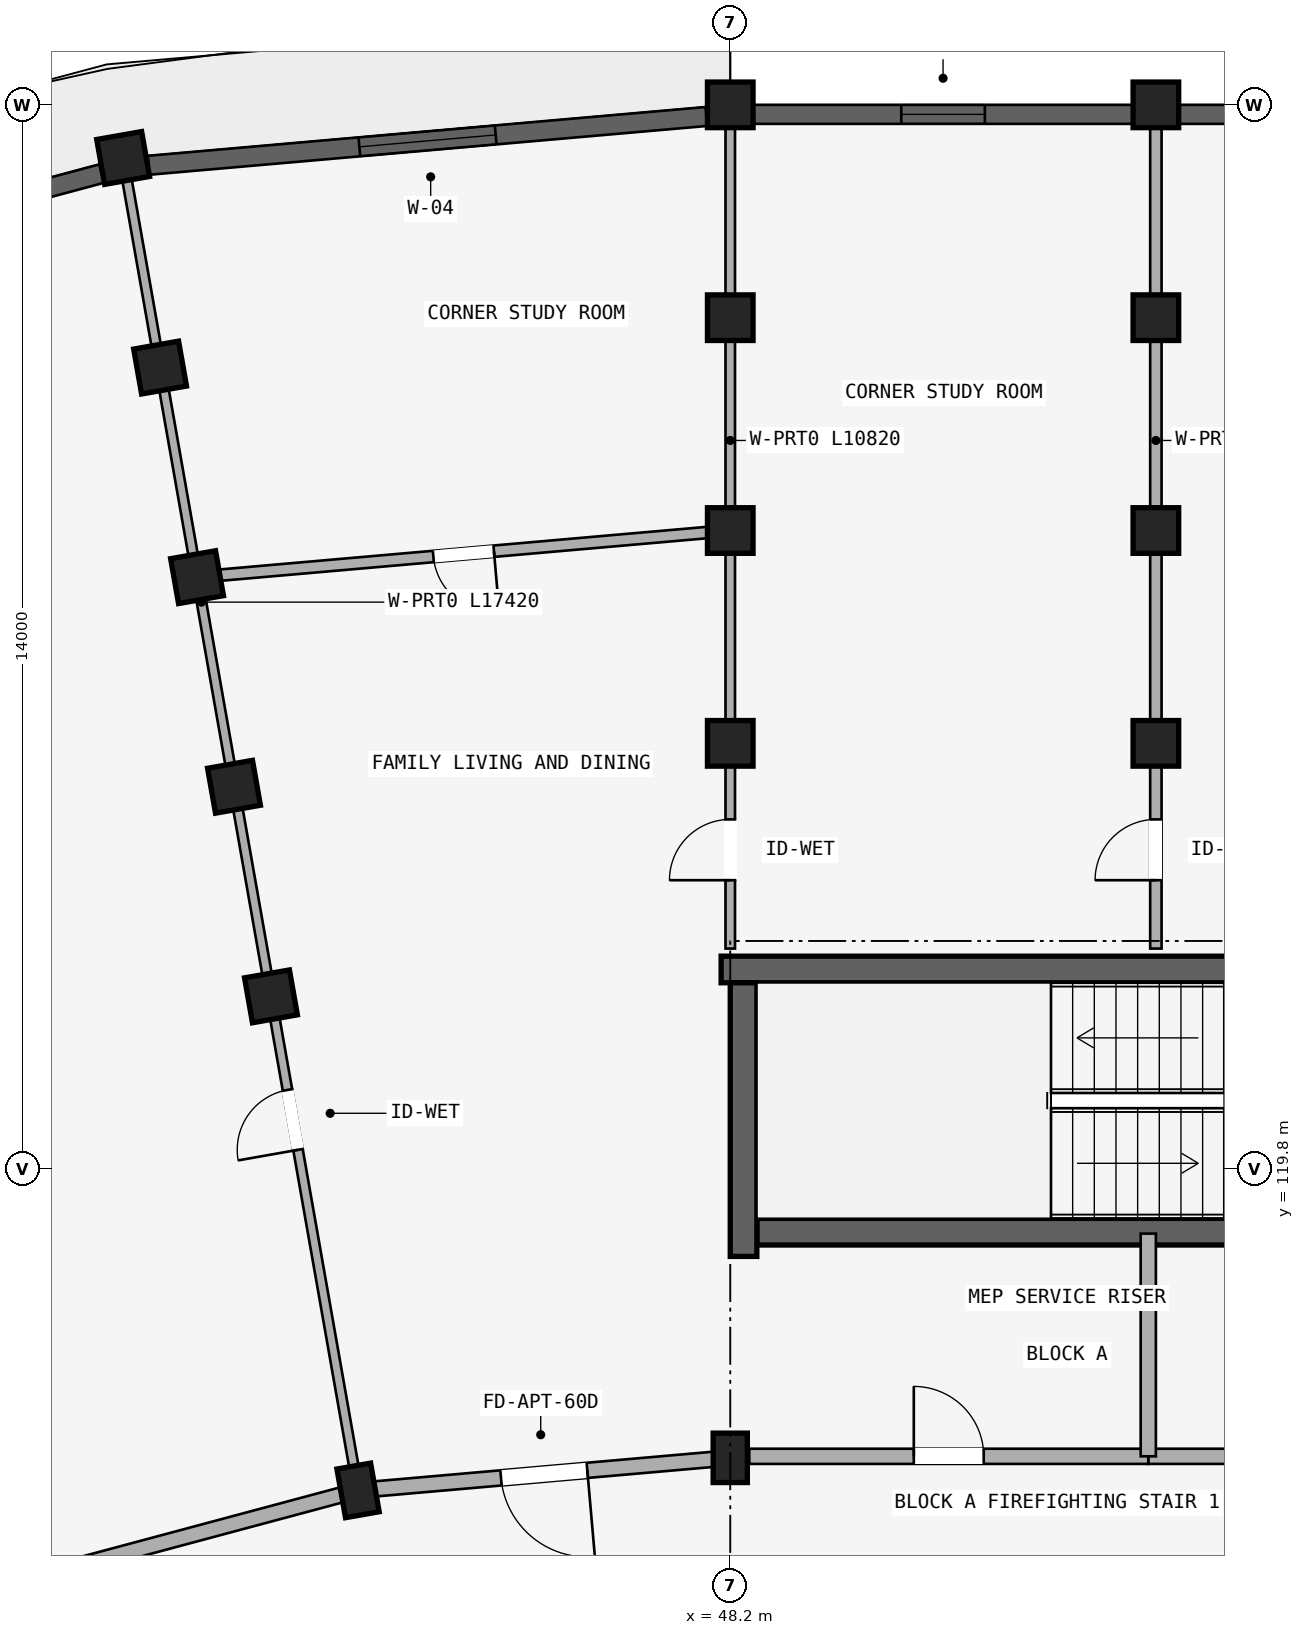
"""IFC4 building model, lengths in metres.
Left out: names, types, materials, properties, quantities, classifications, styles, units other than length and angle.
Written with IfcOpenShell. Run it as: python <this file> out.ifc"""

import sys

from ifc_helpers import new_model, si_unit, direction, frame, frame_2d, origin, origin_2d, place, context, subcontext, project, spatial, rectangle, extrude, element, fill, save


model = new_model("IFC4")
c1 = context("Model", 3, precision=1e-05, world=origin(), true_north=direction((0.0, 1.0)))
c2 = subcontext(c1, "Body", "Model", "MODEL_VIEW")
j1 = project(units=[si_unit("LENGTHUNIT", "METRE"), si_unit("PLANEANGLEUNIT", "RADIAN")], contexts=[c1])
p1 = place(None, origin())
s1 = spatial("IfcSite", under=j1, at=p1, CompositionType="ELEMENT")
p2 = place(p1, origin())
s2 = spatial("IfcBuilding", under=s1, at=p2, CompositionType="ELEMENT")
p3 = place(p2, frame((0.0, 0.0, 30.75)))
s3 = spatial("IfcBuildingStorey", under=s2, at=p3, CompositionType="ELEMENT", Elevation=30.75)
p4 = place(p3, frame((48.08, 122.425, 0.0), z_axis=(0.0, 0.0, 1.0), x_axis=(1.0, 0.0, 0.0)))
e1 = element("IfcWall", 1, at=p4, inside=s3, PredefinedType="SHEAR", context=c2, shape_type="SweptSolid", body=[
    extrude(rectangle(XDim=8.545, YDim=0.35, at=frame_2d((4.272, 0.0))), origin(), (0.0, 0.0, 1.0), 2.93),
])
p5 = place(p3, frame((48.55, 118.975, 0.0), z_axis=(0.0, 0.0, 1.0), x_axis=(1.0, 0.0, 0.0)))
e2 = element("IfcWall", 2, at=p5, inside=s3, PredefinedType="SHEAR", context=c2, shape_type="SweptSolid", body=[
    extrude(rectangle(XDim=8.075, YDim=0.35, at=frame_2d((4.038, 0.0))), origin(), (0.0, 0.0, 1.0), 2.93),
])
p6 = place(p5, frame((6.38, 0.0, 0.0)))
e3 = element("IfcOpeningElement", 3, at=p6, cuts=e2, PredefinedType="OPENING", context=c2, shape_type="SweptSolid", body=[
    extrude(rectangle(XDim=1.24, YDim=2.15, at=frame_2d((0.62, 1.075))), frame((0.0, 0.185, 0.0), z_axis=(0.0, -1.0, 0.0), x_axis=(1.0, 0.0, 0.0)), (0.0, 0.0, 1.0), 0.37),
])
p7 = place(p3, frame((48.375, 118.65, 0.0), z_axis=(0.0, 0.0, 1.0), x_axis=(0.0, 1.0, 0.0)))
e4 = element("IfcWall", 4, at=p7, inside=s3, PredefinedType="SHEAR", context=c2, shape_type="SweptSolid", body=[
    extrude(rectangle(XDim=3.6, YDim=0.35, at=frame_2d((1.8, 0.0))), origin(), (0.0, 0.0, 1.0), 2.93),
])
p8 = place(p3, frame((48.2, 116.0, 0.0), z_axis=(0.0, 0.0, 1.0), x_axis=(1.0, 0.0, 0.0)))
e5 = element("IfcColumn", 5, at=p8, inside=s3, PredefinedType="COLUMN", context=c2, shape_type="SweptSolid", body=[
    extrude(rectangle(XDim=0.45, YDim=0.65, at=origin_2d()), origin(), (0.0, 0.0, 1.0), 2.93),
])
for number, where, z_axis, x_axis in (
    (6, (48.2, 125.4, 0.0), (0.0, 0.0, 1.0), (1.0, 0.0, 0.0)),
    (7, (48.2, 128.2, 0.0), (0.0, 0.0, 1.0), (1.0, 0.0, 0.0)),
    (8, (48.2, 131.0, 0.0), (0.0, 0.0, 1.0), (1.0, 0.0, 0.0)),
    (9, (48.2, 133.8, 0.0), (0.0, 0.0, 1.0), (1.0, 0.0, 0.0)),
):
    element("IfcColumn", number, at=place(p3, frame(where, z_axis=z_axis, x_axis=x_axis)), inside=s3, PredefinedType="COLUMN", context=c2, shape_type="SweptSolid", body=[
        extrude(rectangle(XDim=0.6, YDim=0.6, at=origin_2d()), origin(), (0.0, 0.0, 1.0), 2.93),
    ])
p9 = place(p3, frame((43.303, 115.572, 0.0), z_axis=(0.0, 0.0, 1.0), x_axis=(0.984807753012, 0.173648177667, 0.0)))
e10 = element("IfcColumn", 10, at=p9, inside=s3, PredefinedType="COLUMN", context=c2, shape_type="SweptSolid", body=[
    extrude(rectangle(XDim=0.45, YDim=0.65, at=origin_2d()), origin(), (0.0, 0.0, 1.0), 2.93),
])
for number, where, z_axis, x_axis in (
    (11, (42.157, 122.071, 0.0), (0.0, 0.0, 1.0), (0.985, 0.174, 0.0)),
    (12, (41.671, 124.829, 0.0), (0.0, 0.0, 1.0), (0.985, 0.174, 0.0)),
    (13, (41.185, 127.586, 0.0), (0.0, 0.0, 1.0), (0.985, 0.174, 0.0)),
    (14, (40.698, 130.344, 0.0), (0.0, 0.0, 1.0), (0.985, 0.174, 0.0)),
    (15, (40.212, 133.101, 0.0), (0.0, 0.0, 1.0), (0.985, 0.174, 0.0)),
    (16, (53.8, 125.4, 0.0), (0.0, 0.0, 1.0), (1.0, 0.0, 0.0)),
    (17, (53.8, 128.2, 0.0), (0.0, 0.0, 1.0), (1.0, 0.0, 0.0)),
    (18, (53.8, 131.0, 0.0), (0.0, 0.0, 1.0), (1.0, 0.0, 0.0)),
    (19, (53.8, 133.8, 0.0), (0.0, 0.0, 1.0), (1.0, 0.0, 0.0)),
):
    element("IfcColumn", number, at=place(p3, frame(where, z_axis=z_axis, x_axis=x_axis)), inside=s3, PredefinedType="COLUMN", context=c2, shape_type="SweptSolid", body=[
        extrude(rectangle(XDim=0.6, YDim=0.6, at=origin_2d()), origin(), (0.0, 0.0, 1.0), 2.93),
    ])
p10 = place(p3, frame((53.7, 116.02, 0.0), z_axis=(0.0, 0.0, 1.0), x_axis=(1.0, 0.0, 0.0)))
e20 = element("IfcWall", 20, at=p10, inside=s3, PredefinedType="STANDARD", context=c2, shape_type="SweptSolid", body=[
    extrude(rectangle(XDim=5.65, YDim=0.2, at=frame_2d((2.825, 0.0))), origin(), (0.0, 0.0, 1.0), 2.372),
])
p11 = place(p10, frame((1.923, 0.0, 0.0)))
e21 = element("IfcOpeningElement", 21, at=p11, cuts=e20, PredefinedType="OPENING", context=c2, shape_type="SweptSolid", body=[
    extrude(rectangle(XDim=1.24, YDim=2.15, at=frame_2d((0.62, 1.075))), frame((0.0, 0.11, 0.0), z_axis=(0.0, -1.0, 0.0), x_axis=(1.0, 0.0, 0.0)), (0.0, 0.0, 1.0), 0.22),
])
p12 = place(p3, frame((48.45, 116.02, 0.0), z_axis=(0.0, 0.0, 1.0), x_axis=(1.0, 0.0, 0.0)))
e22 = element("IfcWall", 22, at=p12, inside=s3, PredefinedType="STANDARD", context=c2, shape_type="SweptSolid", body=[
    extrude(rectangle(XDim=5.25, YDim=0.2, at=frame_2d((2.625, 0.0))), origin(), (0.0, 0.0, 1.0), 2.372),
])
p13 = place(p12, frame((2.165, 0.0, 0.0)))
e23 = element("IfcOpeningElement", 23, at=p13, cuts=e22, PredefinedType="OPENING", context=c2, shape_type="SweptSolid", body=[
    extrude(rectangle(XDim=0.92, YDim=2.1, at=frame_2d((0.46, 1.05))), frame((0.0, 0.11, 0.0), z_axis=(0.0, -1.0, 0.0), x_axis=(1.0, 0.0, 0.0)), (0.0, 0.0, 1.0), 0.22),
])
p14 = place(p3, frame((53.7, 116.02, 0.0), z_axis=(0.0, 0.0, 1.0), x_axis=(0.0, 1.0, 0.0)))
e24 = element("IfcWall", 24, at=p14, inside=s3, PredefinedType="STANDARD", context=c2, shape_type="SweptSolid", body=[
    extrude(rectangle(XDim=2.93, YDim=0.2, at=frame_2d((1.465, 0.0))), origin(), (0.0, 0.0, 1.0), 2.372),
])
p15 = place(p3, frame((53.8, 122.7, 0.0), z_axis=(0.0, 0.0, 1.0), x_axis=(0.0, 1.0, 0.0)))
e25 = element("IfcWall", 25, at=p15, inside=s3, PredefinedType="PARTITIONING", context=c2, shape_type="SweptSolid", body=[
    extrude(rectangle(XDim=10.82, YDim=0.15, at=frame_2d((5.41, 0.0))), origin(), (0.0, 0.0, 1.0), 2.372),
])
p16 = place(p15, frame((0.899, 0.0, 0.0)))
e26 = element("IfcOpeningElement", 26, at=p16, cuts=e25, PredefinedType="OPENING", context=c2, shape_type="SweptSolid", body=[
    extrude(rectangle(XDim=0.8, YDim=2.1, at=frame_2d((0.4, 1.05))), frame((0.0, 0.085, 0.0), z_axis=(0.0, -1.0, 0.0), x_axis=(1.0, 0.0, 0.0)), (0.0, 0.0, 1.0), 0.17),
])
p17 = place(p3, frame((48.2, 116.0, 0.0), z_axis=(0.0, 0.0, 1.0), x_axis=(-0.996193663584, -0.087167566415, 0.0)))
e27 = element("IfcWall", 27, at=p17, inside=s3, PredefinedType="STANDARD", context=c2, shape_type="SweptSolid", body=[
    extrude(rectangle(XDim=4.916, YDim=0.2, at=frame_2d((2.458, 0.0))), origin(), (0.0, 0.0, 1.0), 2.372),
])
p18 = place(p17, frame((1.888, 0.0, 0.0)))
e28 = element("IfcOpeningElement", 28, at=p18, cuts=e27, PredefinedType="OPENING", context=c2, shape_type="SweptSolid", body=[
    extrude(rectangle(XDim=1.14, YDim=2.15, at=frame_2d((0.57, 1.075))), frame((0.0, 0.11, 0.0), z_axis=(0.0, -1.0, 0.0), x_axis=(1.0, 0.0, 0.0)), (0.0, 0.0, 1.0), 0.22),
])
p19 = place(p3, frame((43.303, 115.572, 0.0), z_axis=(0.0, 0.0, 1.0), x_axis=(-0.965930095386, -0.258803112091, 0.0)))
e29 = element("IfcWall", 29, at=p19, inside=s3, PredefinedType="STANDARD", context=c2, shape_type="SweptSolid", body=[
    extrude(rectangle(XDim=4.916, YDim=0.2, at=frame_2d((2.458, 0.0))), origin(), (0.0, 0.0, 1.0), 2.372),
])
p20 = place(p3, frame((48.2, 122.7, 0.0), z_axis=(0.0, 0.0, 1.0), x_axis=(0.0, 1.0, 0.0)))
e30 = element("IfcWall", 30, at=p20, inside=s3, PredefinedType="PARTITIONING", context=c2, shape_type="SweptSolid", body=[
    extrude(rectangle(XDim=10.82, YDim=0.125, at=frame_2d((5.41, 0.0))), origin(), (0.0, 0.0, 1.0), 2.372),
])
p21 = place(p20, frame((0.899, 0.0, 0.0)))
e31 = element("IfcOpeningElement", 31, at=p21, cuts=e30, PredefinedType="OPENING", context=c2, shape_type="SweptSolid", body=[
    extrude(rectangle(XDim=0.8, YDim=2.1, at=frame_2d((0.4, 1.05))), frame((0.0, 0.073, 0.0), z_axis=(0.0, -1.0, 0.0), x_axis=(1.0, 0.0, 0.0)), (0.0, 0.0, 1.0), 0.145),
])
p22 = place(p3, frame((43.286, 115.67, 0.0), z_axis=(0.0, 0.0, 1.0), x_axis=(-0.173646216546, 0.984808098809, 0.0)))
e32 = element("IfcWall", 32, at=p22, inside=s3, PredefinedType="PARTITIONING", context=c2, shape_type="SweptSolid", body=[
    extrude(rectangle(XDim=17.42, YDim=0.125, at=frame_2d((8.71, 0.0))), origin(), (0.0, 0.0, 1.0), 2.372),
])
p23 = place(p22, frame((4.45, 0.0, 0.0)))
e33 = element("IfcOpeningElement", 33, at=p23, cuts=e32, PredefinedType="OPENING", context=c2, shape_type="SweptSolid", body=[
    extrude(rectangle(XDim=0.8, YDim=2.1, at=frame_2d((0.4, 1.05))), frame((0.0, 0.073, 0.0), z_axis=(0.0, -1.0, 0.0), x_axis=(1.0, 0.0, 0.0)), (0.0, 0.0, 1.0), 0.145),
])
p24 = place(p3, frame((48.2, 128.2, 0.0), z_axis=(0.0, 0.0, 1.0), x_axis=(-0.996194658198, -0.087156198737, 0.0)))
e34 = element("IfcWall", 34, at=p24, inside=s3, PredefinedType="PLUMBINGWALL", context=c2, shape_type="SweptSolid", body=[
    extrude(rectangle(XDim=7.042, YDim=0.15, at=frame_2d((3.521, 0.0))), origin(), (0.0, 0.0, 1.0), 2.372),
])
p25 = place(p24, frame((3.121, 0.0, 0.0)))
e35 = element("IfcOpeningElement", 35, at=p25, cuts=e34, PredefinedType="OPENING", context=c2, shape_type="SweptSolid", body=[
    extrude(rectangle(XDim=0.8, YDim=2.1, at=frame_2d((0.4, 1.05))), frame((0.0, 0.085, 0.0), z_axis=(0.0, -1.0, 0.0), x_axis=(1.0, 0.0, 0.0)), (0.0, 0.0, 1.0), 0.17),
])
p26 = place(p3, frame((47.886, 133.647, 0.0), z_axis=(0.0, 0.0, 1.0), x_axis=(-0.996197565379, -0.087122963287, 0.0)))
e36 = element("IfcWall", 36, at=p26, inside=s3, PredefinedType="STANDARD", context=c2, shape_type="SweptSolid", body=[
    extrude(rectangle(XDim=7.367, YDim=0.25, at=frame_2d((3.684, 0.0))), origin(), (0.0, 0.0, 1.0), 2.372),
])
p27 = place(p26, frame((2.783, 0.0, 0.522)))
e37 = element("IfcOpeningElement", 37, at=p27, cuts=e36, PredefinedType="OPENING", context=c2, shape_type="SweptSolid", body=[
    extrude(rectangle(XDim=1.8, YDim=1.65, at=frame_2d((0.9, 0.825))), frame((0.0, 0.135, 0.0), z_axis=(0.0, -1.0, 0.0), x_axis=(1.0, 0.0, 0.0)), (0.0, 0.0, 1.0), 0.27),
])
p28 = place(p3, frame((39.93, 132.896, 0.0), z_axis=(0.0, 0.0, 1.0), x_axis=(-0.965925122991, -0.258821669831, 0.0)))
e38 = element("IfcWall", 38, at=p28, inside=s3, PredefinedType="STANDARD", context=c2, shape_type="SweptSolid", body=[
    extrude(rectangle(XDim=7.367, YDim=0.25, at=frame_2d((3.684, 0.0))), origin(), (0.0, 0.0, 1.0), 2.372),
])
p29 = place(p28, frame((4.84, 0.0, 0.372)))
e39 = element("IfcOpeningElement", 39, at=p29, cuts=e38, PredefinedType="OPENING", context=c2, shape_type="SweptSolid", body=[
    extrude(rectangle(XDim=1.2, YDim=1.5, at=frame_2d((0.6, 0.75))), frame((0.0, 0.135, 0.0), z_axis=(0.0, -1.0, 0.0), x_axis=(1.0, 0.0, 0.0)), (0.0, 0.0, 1.0), 0.27),
])
p30 = place(p28, frame((1.948, 0.0, 0.0)))
e40 = element("IfcOpeningElement", 40, at=p30, cuts=e38, PredefinedType="OPENING", context=c2, shape_type="SweptSolid", body=[
    extrude(rectangle(XDim=1.26, YDim=2.15, at=frame_2d((0.63, 1.075))), frame((0.0, 0.135, 0.0), z_axis=(0.0, -1.0, 0.0), x_axis=(1.0, 0.0, 0.0)), (0.0, 0.0, 1.0), 0.27),
])
p31 = place(p3, frame((48.503, 133.675, 0.0), z_axis=(0.0, 0.0, 1.0), x_axis=(1.0, 0.0, 0.0)))
e41 = element("IfcWall", 41, at=p31, inside=s3, PredefinedType="STANDARD", context=c2, shape_type="SweptSolid", body=[
    extrude(rectangle(XDim=4.993, YDim=0.25, at=frame_2d((2.497, 0.0))), origin(), (0.0, 0.0, 1.0), 2.472),
])
p32 = place(p31, frame((1.947, 0.0, 0.822)))
e42 = element("IfcOpeningElement", 42, at=p32, cuts=e41, PredefinedType="OPENING", context=c2, shape_type="SweptSolid", body=[
    extrude(rectangle(XDim=1.1, YDim=1.45, at=frame_2d((0.55, 0.725))), frame((0.0, 0.135, 0.0), z_axis=(0.0, -1.0, 0.0), x_axis=(1.0, 0.0, 0.0)), (0.0, 0.0, 1.0), 0.27),
])
p33 = place(p3, frame((54.104, 133.675, 0.0), z_axis=(0.0, 0.0, 1.0), x_axis=(1.0, 0.0, 0.0)))
e43 = element("IfcWall", 43, at=p33, inside=s3, PredefinedType="STANDARD", context=c2, shape_type="SweptSolid", body=[
    extrude(rectangle(XDim=4.993, YDim=0.25, at=frame_2d((2.497, 0.0))), origin(), (0.0, 0.0, 1.0), 2.472),
])
p34 = place(p33, frame((2.021, 0.0, 0.88)))
e44 = element("IfcOpeningElement", 44, at=p34, cuts=e43, PredefinedType="OPENING", context=c2, shape_type="SweptSolid", body=[
    extrude(rectangle(XDim=0.95, YDim=1.35, at=frame_2d((0.475, 0.675))), frame((0.0, 0.135, 0.0), z_axis=(0.0, -1.0, 0.0), x_axis=(1.0, 0.0, 0.0)), (0.0, 0.0, 1.0), 0.27),
])
p35 = place(p27, origin())
e45 = element("IfcWindow", 45, at=p35, inside=s3, PartitioningType="DOUBLE_PANEL_VERTICAL", PredefinedType="WINDOW", context=c2, shape_type="SweptSolid", body=[
    extrude(rectangle(XDim=1.8, YDim=1.65, at=frame_2d((0.9, 0.825))), frame((0.0, 0.03, 0.0), z_axis=(0.0, -1.0, 0.0), x_axis=(1.0, 0.0, 0.0)), (0.0, 0.0, 1.0), 0.06),
])
fill(e37, e45)
p36 = place(p32, origin())
e46 = element("IfcWindow", 46, at=p36, inside=s3, PartitioningType="SINGLE_PANEL", PredefinedType="WINDOW", context=c2, shape_type="SweptSolid", body=[
    extrude(rectangle(XDim=1.1, YDim=1.45, at=frame_2d((0.55, 0.725))), frame((0.0, 0.03, 0.0), z_axis=(0.0, -1.0, 0.0), x_axis=(1.0, 0.0, 0.0)), (0.0, 0.0, 1.0), 0.06),
])
fill(e42, e46)
p37 = place(p13, origin())
e47 = element("IfcDoor", 47, at=p37, inside=s3, OperationType="SINGLE_SWING_LEFT", PredefinedType="DOOR", context=c2, shape_type="SweptSolid", body=[
    extrude(rectangle(XDim=0.92, YDim=2.1, at=frame_2d((0.46, 1.05))), frame((0.0, 0.025, 0.0), z_axis=(0.0, -1.0, 0.0), x_axis=(1.0, 0.0, 0.0)), (0.0, 0.0, 1.0), 0.05),
])
fill(e23, e47)
p38 = place(p16, origin())
e48 = element("IfcDoor", 48, at=p38, inside=s3, OperationType="SINGLE_SWING_LEFT", PredefinedType="DOOR", context=c2, shape_type="SweptSolid", body=[
    extrude(rectangle(XDim=0.8, YDim=2.1, at=frame_2d((0.4, 1.05))), frame((0.0, 0.025, 0.0), z_axis=(0.0, -1.0, 0.0), x_axis=(1.0, 0.0, 0.0)), (0.0, 0.0, 1.0), 0.05),
])
fill(e26, e48)
p39 = place(p21, origin())
e49 = element("IfcDoor", 49, at=p39, inside=s3, OperationType="SINGLE_SWING_LEFT", PredefinedType="DOOR", context=c2, shape_type="SweptSolid", body=[
    extrude(rectangle(XDim=0.8, YDim=2.1, at=frame_2d((0.4, 1.05))), frame((0.0, 0.025, 0.0), z_axis=(0.0, -1.0, 0.0), x_axis=(1.0, 0.0, 0.0)), (0.0, 0.0, 1.0), 0.05),
])
fill(e31, e49)
p40 = place(p23, origin())
e50 = element("IfcDoor", 50, at=p40, inside=s3, OperationType="SINGLE_SWING_LEFT", PredefinedType="DOOR", context=c2, shape_type="SweptSolid", body=[
    extrude(rectangle(XDim=0.8, YDim=2.1, at=frame_2d((0.4, 1.05))), frame((0.0, 0.025, 0.0), z_axis=(0.0, -1.0, 0.0), x_axis=(1.0, 0.0, 0.0)), (0.0, 0.0, 1.0), 0.05),
])
fill(e33, e50)
p41 = place(p18, origin())
e51 = element("IfcDoor", 51, at=p41, inside=s3, OperationType="SINGLE_SWING_LEFT", PredefinedType="DOOR", context=c2, shape_type="SweptSolid", body=[
    extrude(rectangle(XDim=1.14, YDim=2.15, at=frame_2d((0.57, 1.075))), frame((0.0, 0.025, 0.0), z_axis=(0.0, -1.0, 0.0), x_axis=(1.0, 0.0, 0.0)), (0.0, 0.0, 1.0), 0.05),
])
fill(e28, e51)
p42 = place(p25, frame((0.8, 0.0, 0.0), z_axis=(0.0, 0.0, 1.0), x_axis=(-1.0, 0.0, 0.0)))
e52 = element("IfcDoor", 52, at=p42, inside=s3, OperationType="SINGLE_SWING_RIGHT", PredefinedType="DOOR", context=c2, shape_type="SweptSolid", body=[
    extrude(rectangle(XDim=0.8, YDim=2.1, at=frame_2d((0.4, 1.05))), frame((0.0, 0.025, 0.0), z_axis=(0.0, -1.0, 0.0), x_axis=(1.0, 0.0, 0.0)), (0.0, 0.0, 1.0), 0.05),
])
fill(e35, e52)
save(model, sys.argv[1])
